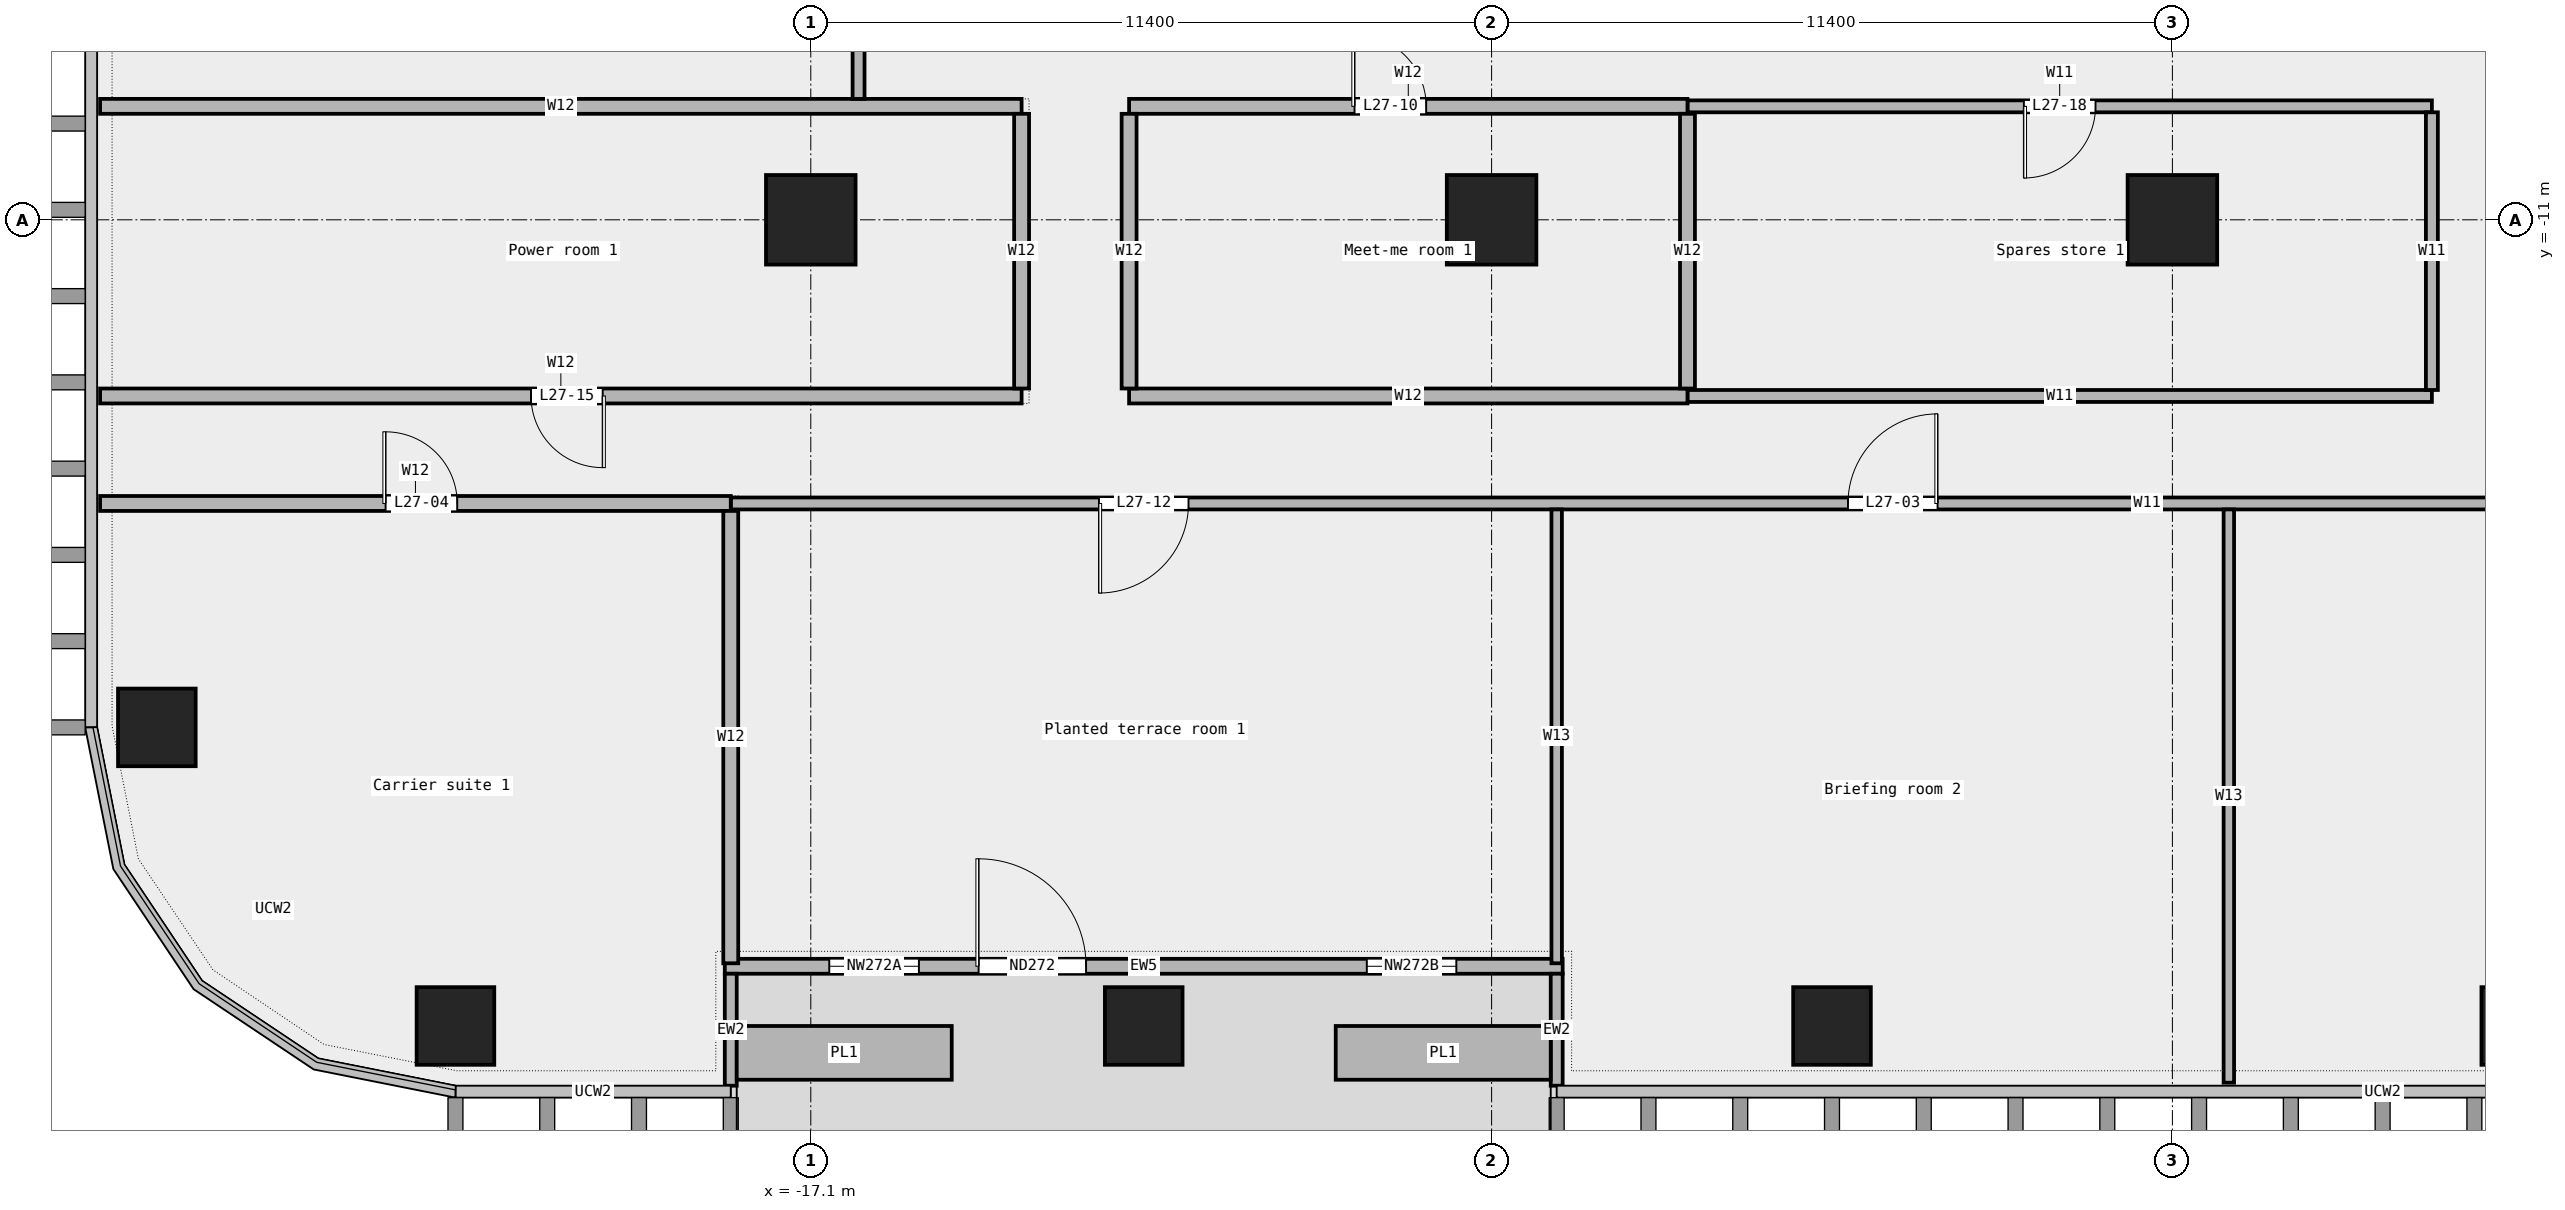
"""IFC4 building model, lengths in metres.
Left out: names, types, materials, properties, quantities, classifications, styles, units other than length and angle.
Written with IfcOpenShell. Run it as: python <this file> out.ifc"""

import sys

from ifc_helpers import new_model, si_unit, direction, frame, frame_2d, origin, origin_2d, place, context, subcontext, project, spatial, rectangle, extrude, element, fill, save


model = new_model("IFC4")
c1 = context("Model", 3, precision=1e-05, world=origin(), true_north=direction((0.0, 1.0)))
c2 = subcontext(c1, "Body", "Model", "MODEL_VIEW")
j1 = project(units=[si_unit("LENGTHUNIT", "METRE"), si_unit("PLANEANGLEUNIT", "RADIAN")], contexts=[c1])
p1 = place(None, origin())
s1 = spatial("IfcSite", under=j1, at=p1, CompositionType="ELEMENT")
p2 = place(p1, origin())
s2 = spatial("IfcBuilding", under=s1, at=p2, CompositionType="ELEMENT")
p3 = place(p2, frame((0.0, 0.0, 135.1)))
s3 = spatial("IfcBuildingStorey", under=s2, at=p3, CompositionType="ELEMENT", Elevation=135.1)
for number, where, z_axis, x_axis in (
    (1, (-23.05, -24.5, 0.0), (0.0, 0.0, 1.0), (1.0, 0.0, 0.0)),
    (2, (-11.525, -24.5, 0.0), (0.0, 0.0, 1.0), (1.0, 0.0, 0.0)),
    (3, (0.0, -24.5, 0.0), (0.0, 0.0, 1.0), (1.0, 0.0, 0.0)),
    (4, (11.525, -24.5, 0.0), (0.0, 0.0, 1.0), (1.0, 0.0, 0.0)),
    (5, (-28.05, -19.5, 0.0), (0.0, 0.0, 1.0), (1.0, 0.0, 0.0)),
):
    element("IfcColumn", number, at=place(p3, frame(where, z_axis=z_axis, x_axis=x_axis)), inside=s3, PredefinedType="COLUMN", context=c2, shape_type="SweptSolid", body=[
        extrude(rectangle(XDim=1.3, YDim=1.3, at=origin_2d()), origin(), (0.0, 0.0, 1.0), 4.05),
    ])
for number, where, z_axis, x_axis in (
    (6, (-17.1, -11.0, 0.0), (0.0, 0.0, 1.0), (1.0, 0.0, 0.0)),
    (7, (-5.7, -11.0, 0.0), (0.0, 0.0, 1.0), (1.0, 0.0, 0.0)),
    (8, (5.7, -11.0, 0.0), (0.0, 0.0, 1.0), (1.0, 0.0, 0.0)),
):
    element("IfcColumn", number, at=place(p3, frame(where, z_axis=z_axis, x_axis=x_axis)), inside=s3, PredefinedType="COLUMN", context=c2, shape_type="SweptSolid", body=[
        extrude(rectangle(XDim=1.5, YDim=1.5, at=origin_2d()), origin(), (0.0, 0.0, 1.0), 4.05),
    ])
p4 = place(p3, frame((-18.54, -23.5, 0.0), z_axis=(0.0, 0.0, 1.0), x_axis=(1.0, 0.0, 0.0)))
e9 = element("IfcWall", 9, at=p4, inside=s3, PredefinedType="STANDARD", context=c2, shape_type="SweptSolid", body=[
    extrude(rectangle(XDim=14.03, YDim=0.25, at=frame_2d((7.015, 0.0))), origin(), (0.0, 0.0, 1.0), 4.05),
])
p5 = place(p4, frame((1.75, 0.0, 0.45)))
e10 = element("IfcOpeningElement", 10, at=p5, cuts=e9, PredefinedType="OPENING", context=c2, shape_type="SweptSolid", body=[
    extrude(rectangle(XDim=1.5, YDim=3.0, at=frame_2d((0.75, 1.5))), frame((0.0, 0.137, 0.0), z_axis=(0.0, -1.0, 0.0), x_axis=(1.0, 0.0, 0.0)), (0.0, 0.0, 1.0), 0.274),
])
p6 = place(p4, frame((4.25, 0.0, 0.0)))
e11 = element("IfcOpeningElement", 11, at=p6, cuts=e9, PredefinedType="OPENING", context=c2, shape_type="SweptSolid", body=[
    extrude(rectangle(XDim=1.8, YDim=2.4, at=frame_2d((0.9, 1.2))), frame((0.0, 0.137, 0.0), z_axis=(0.0, -1.0, 0.0), x_axis=(1.0, 0.0, 0.0)), (0.0, 0.0, 1.0), 0.274),
])
p7 = place(p4, frame((10.75, 0.0, 0.45)))
e12 = element("IfcOpeningElement", 12, at=p7, cuts=e9, PredefinedType="OPENING", context=c2, shape_type="SweptSolid", body=[
    extrude(rectangle(XDim=1.5, YDim=3.0, at=frame_2d((0.75, 1.5))), frame((0.0, 0.137, 0.0), z_axis=(0.0, -1.0, 0.0), x_axis=(1.0, 0.0, 0.0)), (0.0, 0.0, 1.0), 0.274),
])
for number, where, z_axis, x_axis in (
    (13, (-18.44, -25.5, 0.0), (0.0, 0.0, 1.0), (0.0, 1.0, 0.0)),
    (14, (-4.61, -25.5, 0.0), (0.0, 0.0, 1.0), (0.0, 1.0, 0.0)),
):
    element("IfcWall", number, at=place(p3, frame(where, z_axis=z_axis, x_axis=x_axis)), inside=s3, PredefinedType="STANDARD", context=c2, shape_type="SweptSolid", body=[
        extrude(rectangle(XDim=1.875, YDim=0.2, at=frame_2d((0.938, 0.0))), origin(), (0.0, 0.0, 1.0), 4.05),
    ])
for number, where, z_axis, x_axis in (
    (15, (-18.34, -24.95, 0.0), (0.0, 0.0, 1.0), (1.0, 0.0, 0.0)),
    (16, (-8.31, -24.95, 0.0), (0.0, 0.0, 1.0), (1.0, 0.0, 0.0)),
):
    element("IfcWall", number, at=place(p3, frame(where, z_axis=z_axis, x_axis=x_axis)), inside=s3, PredefinedType="STANDARD", context=c2, shape_type="SweptSolid", body=[
        extrude(rectangle(XDim=3.6, YDim=0.9, at=frame_2d((1.8, 0.0))), origin(), (0.0, 0.0, 1.0), 0.7),
    ])
p8 = place(p3, frame((-18.44, -15.75, 0.0), z_axis=(0.0, 0.0, 1.0), x_axis=(1.0, 0.0, 0.0)))
e17 = element("IfcWall", 17, at=p8, inside=s3, PredefinedType="PARTITIONING", context=c2, shape_type="SweptSolid", body=[
    extrude(rectangle(XDim=47.44, YDim=0.2, at=frame_2d((23.72, 0.0))), origin(), (0.0, 0.0, 1.0), 4.05),
])
p9 = place(p8, frame((18.708, 0.0, 0.0)))
e18 = element("IfcOpeningElement", 18, at=p9, cuts=e17, PredefinedType="OPENING", context=c2, shape_type="SweptSolid", body=[
    extrude(rectangle(XDim=1.5, YDim=2.1, at=frame_2d((0.75, 1.05))), frame((0.0, 0.112, 0.0), z_axis=(0.0, -1.0, 0.0), x_axis=(1.0, 0.0, 0.0)), (0.0, 0.0, 1.0), 0.224),
])
p10 = place(p8, frame((6.165, 0.0, 0.0)))
e19 = element("IfcOpeningElement", 19, at=p10, cuts=e17, PredefinedType="OPENING", context=c2, shape_type="SweptSolid", body=[
    extrude(rectangle(XDim=1.5, YDim=2.1, at=frame_2d((0.75, 1.05))), frame((0.0, 0.112, 0.0), z_axis=(0.0, -1.0, 0.0), x_axis=(1.0, 0.0, 0.0)), (0.0, 0.0, 1.0), 0.224),
])
p11 = place(p8, frame((35.262, 0.0, 0.0)))
e20 = element("IfcOpeningElement", 20, at=p11, cuts=e17, PredefinedType="OPENING", context=c2, shape_type="SweptSolid", body=[
    extrude(rectangle(XDim=1.8, YDim=2.1, at=frame_2d((0.9, 1.05))), frame((0.0, 0.112, 0.0), z_axis=(0.0, -1.0, 0.0), x_axis=(1.0, 0.0, 0.0)), (0.0, 0.0, 1.0), 0.224),
])
p12 = place(p3, frame((-29.0, -15.75, 0.0), z_axis=(0.0, 0.0, 1.0), x_axis=(1.0, 0.0, 0.0)))
e21 = element("IfcWall", 21, at=p12, inside=s3, PredefinedType="PARTITIONING", context=c2, shape_type="SweptSolid", body=[
    extrude(rectangle(XDim=10.56, YDim=0.25, at=frame_2d((5.28, 0.0))), origin(), (0.0, 0.0, 1.0), 4.05),
])
p13 = place(p12, frame((4.78, 0.0, 0.0)))
e22 = element("IfcOpeningElement", 22, at=p13, cuts=e21, PredefinedType="OPENING", context=c2, shape_type="SweptSolid", body=[
    extrude(rectangle(XDim=1.2, YDim=2.1, at=frame_2d((0.6, 1.05))), frame((0.0, 0.137, 0.0), z_axis=(0.0, -1.0, 0.0), x_axis=(1.0, 0.0, 0.0)), (0.0, 0.0, 1.0), 0.274),
])
p14 = place(p3, frame((-2.42, -13.95, 0.0), z_axis=(0.0, 0.0, 1.0), x_axis=(1.0, 0.0, 0.0)))
e23 = element("IfcWall", 23, at=p14, inside=s3, PredefinedType="PARTITIONING", context=c2, shape_type="SweptSolid", body=[
    extrude(rectangle(XDim=12.465, YDim=0.2, at=frame_2d((6.232, 0.0))), origin(), (0.0, 0.0, 1.0), 4.05),
])
p15 = place(p3, frame((-29.0, -13.95, 0.0), z_axis=(0.0, 0.0, 1.0), x_axis=(1.0, 0.0, 0.0)))
e24 = element("IfcWall", 24, at=p15, inside=s3, PredefinedType="PARTITIONING", context=c2, shape_type="SweptSolid", body=[
    extrude(rectangle(XDim=15.43, YDim=0.25, at=frame_2d((7.715, 0.0))), origin(), (0.0, 0.0, 1.0), 4.05),
])
p16 = place(p15, frame((7.215, 0.0, 0.0)))
e25 = element("IfcOpeningElement", 25, at=p16, cuts=e24, PredefinedType="OPENING", context=c2, shape_type="SweptSolid", body=[
    extrude(rectangle(XDim=1.2, YDim=2.1, at=frame_2d((0.6, 1.05))), frame((0.0, 0.137, 0.0), z_axis=(0.0, -1.0, 0.0), x_axis=(1.0, 0.0, 0.0)), (0.0, 0.0, 1.0), 0.274),
])
p17 = place(p3, frame((-11.77, -13.95, 0.0), z_axis=(0.0, 0.0, 1.0), x_axis=(1.0, 0.0, 0.0)))
e26 = element("IfcWall", 26, at=p17, inside=s3, PredefinedType="PARTITIONING", context=c2, shape_type="SweptSolid", body=[
    extrude(rectangle(XDim=9.35, YDim=0.25, at=frame_2d((4.675, 0.0))), origin(), (0.0, 0.0, 1.0), 4.05),
])
p18 = place(p3, frame((-2.42, -9.1, 0.0), z_axis=(0.0, 0.0, 1.0), x_axis=(1.0, 0.0, 0.0)))
e27 = element("IfcWall", 27, at=p18, inside=s3, PredefinedType="PARTITIONING", context=c2, shape_type="SweptSolid", body=[
    extrude(rectangle(XDim=12.465, YDim=0.2, at=frame_2d((6.232, 0.0))), origin(), (0.0, 0.0, 1.0), 4.05),
])
p19 = place(p18, frame((5.633, 0.0, 0.0)))
e28 = element("IfcOpeningElement", 28, at=p19, cuts=e27, PredefinedType="OPENING", context=c2, shape_type="SweptSolid", body=[
    extrude(rectangle(XDim=1.2, YDim=2.1, at=frame_2d((0.6, 1.05))), frame((0.0, 0.112, 0.0), z_axis=(0.0, -1.0, 0.0), x_axis=(1.0, 0.0, 0.0)), (0.0, 0.0, 1.0), 0.224),
])
p20 = place(p3, frame((-29.0, -9.1, 0.0), z_axis=(0.0, 0.0, 1.0), x_axis=(1.0, 0.0, 0.0)))
e29 = element("IfcWall", 29, at=p20, inside=s3, PredefinedType="PARTITIONING", context=c2, shape_type="SweptSolid", body=[
    extrude(rectangle(XDim=15.43, YDim=0.25, at=frame_2d((7.715, 0.0))), origin(), (0.0, 0.0, 1.0), 4.05),
])
p21 = place(p3, frame((-11.77, -9.1, 0.0), z_axis=(0.0, 0.0, 1.0), x_axis=(1.0, 0.0, 0.0)))
e30 = element("IfcWall", 30, at=p21, inside=s3, PredefinedType="PARTITIONING", context=c2, shape_type="SweptSolid", body=[
    extrude(rectangle(XDim=9.35, YDim=0.25, at=frame_2d((4.675, 0.0))), origin(), (0.0, 0.0, 1.0), 4.05),
])
p22 = place(p21, frame((3.775, 0.0, 0.0)))
e31 = element("IfcOpeningElement", 31, at=p22, cuts=e30, PredefinedType="OPENING", context=c2, shape_type="SweptSolid", body=[
    extrude(rectangle(XDim=1.2, YDim=2.1, at=frame_2d((0.6, 1.05))), frame((0.0, 0.137, 0.0), z_axis=(0.0, -1.0, 0.0), x_axis=(1.0, 0.0, 0.0)), (0.0, 0.0, 1.0), 0.274),
])
p23 = place(p3, frame((-18.44, -23.45, 0.0), z_axis=(0.0, 0.0, 1.0), x_axis=(0.0, 1.0, 0.0)))
e32 = element("IfcWall", 32, at=p23, inside=s3, PredefinedType="PARTITIONING", context=c2, shape_type="SweptSolid", body=[
    extrude(rectangle(XDim=7.575, YDim=0.25, at=frame_2d((3.788, 0.0))), origin(), (0.0, 0.0, 1.0), 4.05),
])
p24 = place(p3, frame((-16.3, -8.975, 0.0), z_axis=(0.0, 0.0, 1.0), x_axis=(0.0, 1.0, 0.0)))
e33 = element("IfcWall", 33, at=p24, inside=s3, PredefinedType="PARTITIONING", context=c2, shape_type="SweptSolid", body=[
    extrude(rectangle(XDim=8.225, YDim=0.2, at=frame_2d((4.113, 0.0))), origin(), (0.0, 0.0, 1.0), 4.05),
])
p25 = place(p24, frame((3.363, 0.0, 0.0)))
e34 = element("IfcOpeningElement", 34, at=p25, cuts=e33, PredefinedType="OPENING", context=c2, shape_type="SweptSolid", body=[
    extrude(rectangle(XDim=1.5, YDim=2.1, at=frame_2d((0.75, 1.05))), frame((0.0, 0.112, 0.0), z_axis=(0.0, -1.0, 0.0), x_axis=(1.0, 0.0, 0.0)), (0.0, 0.0, 1.0), 0.224),
])
for number, where, z_axis, x_axis in (
    (35, (-13.57, -13.825, 0.0), (0.0, 0.0, 1.0), (0.0, 1.0, 0.0)),
    (36, (-11.77, -13.825, 0.0), (0.0, 0.0, 1.0), (0.0, 1.0, 0.0)),
):
    element("IfcWall", number, at=place(p3, frame(where, z_axis=z_axis, x_axis=x_axis)), inside=s3, PredefinedType="PARTITIONING", context=c2, shape_type="SweptSolid", body=[
        extrude(rectangle(XDim=4.6, YDim=0.25, at=frame_2d((2.3, 0.0))), origin(), (0.0, 0.0, 1.0), 4.05),
    ])
p26 = place(p3, frame((-4.61, -23.45, 0.0), z_axis=(0.0, 0.0, 1.0), x_axis=(0.0, 1.0, 0.0)))
e37 = element("IfcWall", 37, at=p26, inside=s3, PredefinedType="PARTITIONING", context=c2, shape_type="SweptSolid", body=[
    extrude(rectangle(XDim=7.6, YDim=0.175, at=frame_2d((3.8, 0.0))), origin(), (0.0, 0.0, 1.0), 4.05),
])
p27 = place(p3, frame((-2.42, -13.825, 0.0), z_axis=(0.0, 0.0, 1.0), x_axis=(0.0, 1.0, 0.0)))
e38 = element("IfcWall", 38, at=p27, inside=s3, PredefinedType="PARTITIONING", context=c2, shape_type="SweptSolid", body=[
    extrude(rectangle(XDim=4.6, YDim=0.25, at=frame_2d((2.3, 0.0))), origin(), (0.0, 0.0, 1.0), 4.05),
])
p28 = place(p3, frame((6.645, -25.45, 0.0), z_axis=(0.0, 0.0, 1.0), x_axis=(0.0, 1.0, 0.0)))
e39 = element("IfcWall", 39, at=p28, inside=s3, PredefinedType="PARTITIONING", context=c2, shape_type="SweptSolid", body=[
    extrude(rectangle(XDim=9.6, YDim=0.175, at=frame_2d((4.8, 0.0))), origin(), (0.0, 0.0, 1.0), 4.05),
])
p29 = place(p3, frame((10.045, -13.85, 0.0), z_axis=(0.0, 0.0, 1.0), x_axis=(0.0, 1.0, 0.0)))
e40 = element("IfcWall", 40, at=p29, inside=s3, PredefinedType="PARTITIONING", context=c2, shape_type="SweptSolid", body=[
    extrude(rectangle(XDim=4.65, YDim=0.2, at=frame_2d((2.325, 0.0))), origin(), (0.0, 0.0, 1.0), 4.05),
])
p30 = place(p5, origin())
e41 = element("IfcWindow", 41, at=p30, inside=s3, PartitioningType="SINGLE_PANEL", PredefinedType="WINDOW", context=c2, shape_type="SweptSolid", body=[
    extrude(rectangle(XDim=1.5, YDim=3.0, at=frame_2d((0.75, 1.5))), frame((0.0, 0.03, 0.0), z_axis=(0.0, -1.0, 0.0), x_axis=(1.0, 0.0, 0.0)), (0.0, 0.0, 1.0), 0.06),
])
fill(e10, e41)
p31 = place(p6, origin())
e42 = element("IfcDoor", 42, at=p31, inside=s3, OperationType="DOUBLE_DOOR_SINGLE_SWING", PredefinedType="DOOR", context=c2, shape_type="SweptSolid", body=[
    extrude(rectangle(XDim=1.8, YDim=2.4, at=frame_2d((0.9, 1.2))), frame((0.0, 0.025, 0.0), z_axis=(0.0, -1.0, 0.0), x_axis=(1.0, 0.0, 0.0)), (0.0, 0.0, 1.0), 0.05),
])
fill(e11, e42)
p32 = place(p7, origin())
e43 = element("IfcWindow", 43, at=p32, inside=s3, PartitioningType="SINGLE_PANEL", PredefinedType="WINDOW", context=c2, shape_type="SweptSolid", body=[
    extrude(rectangle(XDim=1.5, YDim=3.0, at=frame_2d((0.75, 1.5))), frame((0.0, 0.03, 0.0), z_axis=(0.0, -1.0, 0.0), x_axis=(1.0, 0.0, 0.0)), (0.0, 0.0, 1.0), 0.06),
])
fill(e12, e43)
p33 = place(p9, origin())
e44 = element("IfcDoor", 44, at=p33, inside=s3, OperationType="DOUBLE_DOOR_SINGLE_SWING", PredefinedType="DOOR", context=c2, shape_type="SweptSolid", body=[
    extrude(rectangle(XDim=1.5, YDim=2.1, at=frame_2d((0.75, 1.05))), frame((0.0, 0.025, 0.0), z_axis=(0.0, -1.0, 0.0), x_axis=(1.0, 0.0, 0.0)), (0.0, 0.0, 1.0), 0.05),
])
fill(e18, e44)
p34 = place(p13, origin())
e45 = element("IfcDoor", 45, at=p34, inside=s3, OperationType="SINGLE_SWING_LEFT", PredefinedType="DOOR", context=c2, shape_type="SweptSolid", body=[
    extrude(rectangle(XDim=1.2, YDim=2.1, at=frame_2d((0.6, 1.05))), frame((0.0, 0.025, 0.0), z_axis=(0.0, -1.0, 0.0), x_axis=(1.0, 0.0, 0.0)), (0.0, 0.0, 1.0), 0.05),
])
fill(e22, e45)
p35 = place(p22, origin())
e46 = element("IfcDoor", 46, at=p35, inside=s3, OperationType="SINGLE_SWING_LEFT", PredefinedType="DOOR", context=c2, shape_type="SweptSolid", body=[
    extrude(rectangle(XDim=1.2, YDim=2.1, at=frame_2d((0.6, 1.05))), frame((0.0, 0.025, 0.0), z_axis=(0.0, -1.0, 0.0), x_axis=(1.0, 0.0, 0.0)), (0.0, 0.0, 1.0), 0.05),
])
fill(e31, e46)
p36 = place(p10, origin())
e47 = element("IfcDoor", 47, at=p36, inside=s3, OperationType="DOUBLE_DOOR_SINGLE_SWING", PredefinedType="DOOR", context=c2, shape_type="SweptSolid", body=[
    extrude(rectangle(XDim=1.5, YDim=2.1, at=frame_2d((0.75, 1.05))), frame((0.0, 0.025, 0.0), z_axis=(0.0, -1.0, 0.0), x_axis=(1.0, 0.0, 0.0)), (0.0, 0.0, 1.0), 0.05),
])
fill(e19, e47)
p37 = place(p16, origin())
e48 = element("IfcDoor", 48, at=p37, inside=s3, OperationType="SINGLE_SWING_LEFT", PredefinedType="DOOR", context=c2, shape_type="SweptSolid", body=[
    extrude(rectangle(XDim=1.2, YDim=2.1, at=frame_2d((0.6, 1.05))), frame((0.0, 0.025, 0.0), z_axis=(0.0, -1.0, 0.0), x_axis=(1.0, 0.0, 0.0)), (0.0, 0.0, 1.0), 0.05),
])
fill(e25, e48)
p38 = place(p19, origin())
e49 = element("IfcDoor", 49, at=p38, inside=s3, OperationType="SINGLE_SWING_RIGHT", PredefinedType="DOOR", context=c2, shape_type="SweptSolid", body=[
    extrude(rectangle(XDim=1.2, YDim=2.1, at=frame_2d((0.6, 1.05))), frame((0.0, 0.025, 0.0), z_axis=(0.0, -1.0, 0.0), x_axis=(1.0, 0.0, 0.0)), (0.0, 0.0, 1.0), 0.05),
])
fill(e28, e49)
save(model, sys.argv[1])
